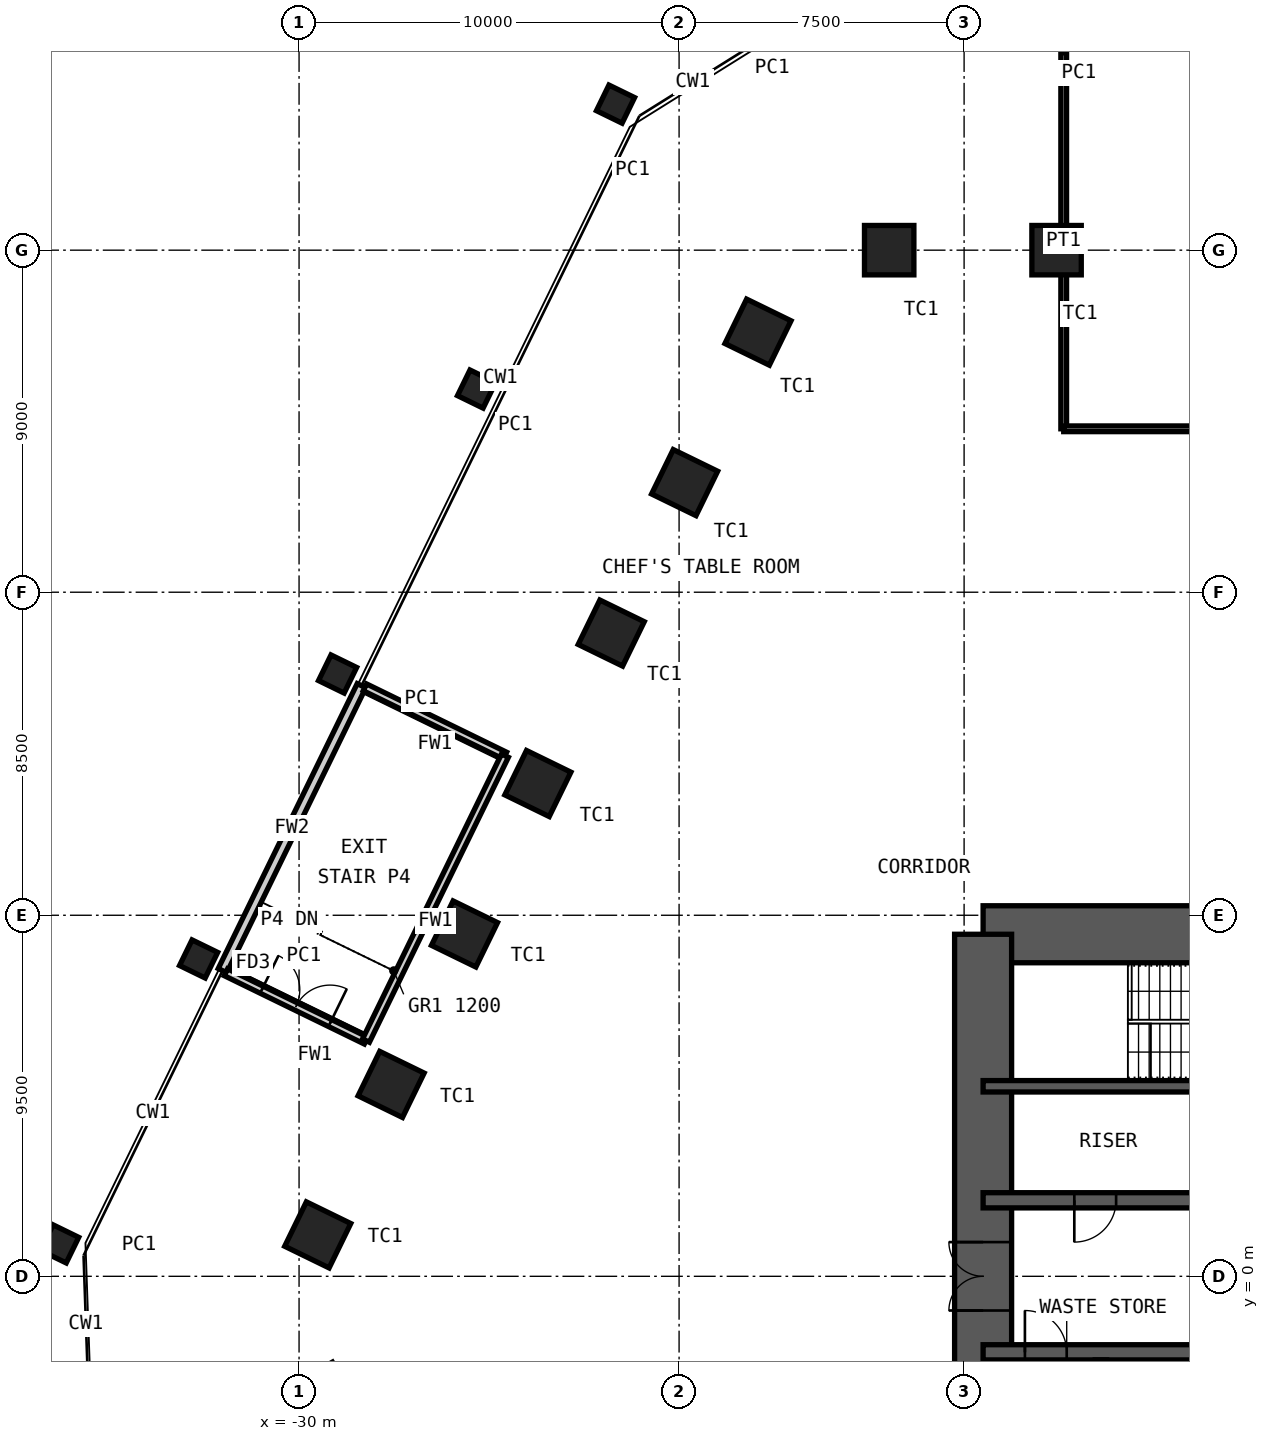
"""IFC4 building model, lengths in metres.
Left out: names, types, materials, properties, quantities, classifications, styles, units other than length and angle.
Written with IfcOpenShell. Run it as: python <this file> out.ifc"""

import sys

from ifc_helpers import new_model, si_unit, direction, frame, frame_2d, origin, origin_2d, place, context, subcontext, project, spatial, rectangle, hollow_rectangle, extrude, element, fill, save


model = new_model("IFC4")
c1 = context("Model", 3, precision=1e-05, world=origin(), true_north=direction((0.0, 1.0)))
c2 = subcontext(c1, "Body", "Model", "MODEL_VIEW")
j1 = project(units=[si_unit("LENGTHUNIT", "METRE"), si_unit("PLANEANGLEUNIT", "RADIAN")], contexts=[c1])
p1 = place(None, origin())
s1 = spatial("IfcSite", under=j1, at=p1, CompositionType="ELEMENT")
p2 = place(p1, origin())
s2 = spatial("IfcBuilding", under=s1, at=p2, CompositionType="ELEMENT")
p3 = place(p2, frame((0.0, 0.0, 12.0)))
s3 = spatial("IfcBuildingStorey", under=s2, at=p3, CompositionType="ELEMENT", Elevation=12.0)
for number, where, z_axis, x_axis in (
    (1, (-14.471, 27.0, 0.0), (0.0, 0.0, 1.0), (-1.0, 0.0, 0.0)),
    (2, (-10.067, 27.0, 0.0), (0.0, 0.0, 1.0), (-1.0, 0.0, 0.0)),
    (3, (-29.509, 1.09, 0.0), (0.0, 0.0, 1.0), (-0.438, -0.899, 0.0)),
    (4, (-27.578, 5.049, 0.0), (0.0, 0.0, 1.0), (-0.438, -0.899, 0.0)),
    (5, (-25.647, 9.008, 0.0), (0.0, 0.0, 1.0), (-0.438, -0.899, 0.0)),
    (6, (-23.716, 12.966, 0.0), (0.0, 0.0, 1.0), (-0.438, -0.899, 0.0)),
    (7, (-21.785, 16.925, 0.0), (0.0, 0.0, 1.0), (-0.438, -0.899, 0.0)),
    (8, (-19.854, 20.884, 0.0), (0.0, 0.0, 1.0), (-0.438, -0.899, 0.0)),
    (9, (-17.924, 24.843, 0.0), (0.0, 0.0, 1.0), (-0.438, -0.899, 0.0)),
):
    element("IfcColumn", number, at=place(p3, frame(where, z_axis=z_axis, x_axis=x_axis)), inside=s3, PredefinedType="COLUMN", context=c2, shape_type="SweptSolid", body=[
        extrude(hollow_rectangle(XDim=1.3, YDim=1.3, WallThickness=0.1, at=origin_2d()), origin(), (0.0, 0.0, 1.0), 5.0),
    ])
for number, where, z_axis, x_axis in (
    (10, (-36.3, 0.853, 0.0), (0.0, 0.0, 1.0), (-0.438, -0.899, 0.0)),
    (11, (-32.643, 8.35, 0.0), (0.0, 0.0, 1.0), (-0.438, -0.899, 0.0)),
    (12, (-28.986, 15.848, 0.0), (0.0, 0.0, 1.0), (-0.438, -0.899, 0.0)),
    (13, (-25.33, 23.345, 0.0), (0.0, 0.0, 1.0), (-0.438, -0.899, 0.0)),
    (14, (-21.673, 30.843, 0.0), (0.0, 0.0, 1.0), (-0.438, -0.899, 0.0)),
):
    element("IfcColumn", number, at=place(p3, frame(where, z_axis=z_axis, x_axis=x_axis)), inside=s3, PredefinedType="COLUMN", context=c2, shape_type="SweptSolid", body=[
        extrude(hollow_rectangle(XDim=0.75, YDim=0.75, WallThickness=0.036, at=origin_2d()), origin(), (0.0, 0.0, 1.0), 5.0),
    ])
p4 = place(p3, frame((-12.0, 9.0, 0.0), z_axis=(0.0, 0.0, 1.0), x_axis=(1.0, 0.0, 0.0)))
e15 = element("IfcWall", 15, at=p4, inside=s3, PredefinedType="SHEAR", context=c2, shape_type="SweptSolid", body=[
    extrude(rectangle(XDim=24.0, YDim=1.5, at=frame_2d((12.0, 0.0))), origin(), (0.0, 0.0, 1.0), 5.0),
])
p5 = place(p4, frame((10.4, 0.0, 0.0)))
e16 = element("IfcOpeningElement", 16, at=p5, cuts=e15, PredefinedType="OPENING", context=c2, shape_type="SweptSolid", body=[
    extrude(rectangle(XDim=1.0, YDim=2.1, at=frame_2d((0.5, 1.05))), frame((0.0, 0.76, 0.0), z_axis=(0.0, -1.0, 0.0), x_axis=(1.0, 0.0, 0.0)), (0.0, 0.0, 1.0), 1.52),
])
p6 = place(p4, frame((17.6, 0.0, 0.0)))
e17 = element("IfcOpeningElement", 17, at=p6, cuts=e15, PredefinedType="OPENING", context=c2, shape_type="SweptSolid", body=[
    extrude(rectangle(XDim=0.9, YDim=2.1, at=frame_2d((0.45, 1.05))), frame((0.0, 0.76, 0.0), z_axis=(0.0, -1.0, 0.0), x_axis=(1.0, 0.0, 0.0)), (0.0, 0.0, 1.0), 1.52),
])
p7 = place(p4, frame((21.9, 0.0, 0.0)))
e18 = element("IfcOpeningElement", 18, at=p7, cuts=e15, PredefinedType="OPENING", context=c2, shape_type="SweptSolid", body=[
    extrude(rectangle(XDim=0.9, YDim=2.1, at=frame_2d((0.45, 1.05))), frame((0.0, 0.76, 0.0), z_axis=(0.0, -1.0, 0.0), x_axis=(1.0, 0.0, 0.0)), (0.0, 0.0, 1.0), 1.52),
])
p8 = place(p3, frame((-12.0, -9.0, 0.0), z_axis=(0.0, 0.0, 1.0), x_axis=(0.0, 1.0, 0.0)))
e19 = element("IfcWall", 19, at=p8, inside=s3, PredefinedType="SHEAR", context=c2, shape_type="SweptSolid", body=[
    extrude(rectangle(XDim=18.0, YDim=1.5, at=frame_2d((9.0, 0.0))), origin(), (0.0, 0.0, 1.0), 5.0),
])
p9 = place(p8, frame((8.1, 0.0, 0.0)))
e20 = element("IfcOpeningElement", 20, at=p9, cuts=e19, PredefinedType="OPENING", context=c2, shape_type="SweptSolid", body=[
    extrude(rectangle(XDim=1.8, YDim=2.1, at=frame_2d((0.9, 1.05))), frame((0.0, 0.76, 0.0), z_axis=(0.0, -1.0, 0.0), x_axis=(1.0, 0.0, 0.0)), (0.0, 0.0, 1.0), 1.52),
])
p10 = place(p3, frame((-12.0, 5.0, 0.0), z_axis=(0.0, 0.0, 1.0), x_axis=(1.0, 0.0, 0.0)))
e21 = element("IfcWall", 21, at=p10, inside=s3, PredefinedType="SHEAR", context=c2, shape_type="SweptSolid", body=[
    extrude(rectangle(XDim=24.0, YDim=0.3, at=frame_2d((12.0, 0.0))), origin(), (0.0, 0.0, 1.0), 5.0),
])
p11 = place(p3, frame((-12.0, 2.0, 0.0), z_axis=(0.0, 0.0, 1.0), x_axis=(1.0, 0.0, 0.0)))
e22 = element("IfcWall", 22, at=p11, inside=s3, PredefinedType="SHEAR", context=c2, shape_type="SweptSolid", body=[
    extrude(rectangle(XDim=24.0, YDim=0.4, at=frame_2d((12.0, 0.0))), origin(), (0.0, 0.0, 1.0), 5.0),
])
p12 = place(p11, frame((2.4, 0.0, 0.0)))
e23 = element("IfcOpeningElement", 23, at=p12, cuts=e22, PredefinedType="OPENING", context=c2, shape_type="SweptSolid", body=[
    extrude(rectangle(XDim=1.1, YDim=2.1, at=frame_2d((0.55, 1.05))), frame((0.0, 0.21, 0.0), z_axis=(0.0, -1.0, 0.0), x_axis=(1.0, 0.0, 0.0)), (0.0, 0.0, 1.0), 0.42),
])
p13 = place(p11, frame((22.0, 0.0, 0.0)))
e24 = element("IfcOpeningElement", 24, at=p13, cuts=e22, PredefinedType="OPENING", context=c2, shape_type="SweptSolid", body=[
    extrude(rectangle(XDim=1.1, YDim=2.1, at=frame_2d((0.55, 1.05))), frame((0.0, 0.21, 0.0), z_axis=(0.0, -1.0, 0.0), x_axis=(1.0, 0.0, 0.0)), (0.0, 0.0, 1.0), 0.42),
])
p14 = place(p11, frame((10.15, 0.0, 0.0)))
e25 = element("IfcOpeningElement", 25, at=p14, cuts=e22, PredefinedType="OPENING", context=c2, shape_type="SweptSolid", body=[
    extrude(rectangle(XDim=1.0, YDim=2.1, at=frame_2d((0.5, 1.05))), frame((0.0, 0.21, 0.0), z_axis=(0.0, -1.0, 0.0), x_axis=(1.0, 0.0, 0.0)), (0.0, 0.0, 1.0), 0.42),
])
p15 = place(p11, frame((6.7, 0.0, 0.0)))
e26 = element("IfcOpeningElement", 26, at=p15, cuts=e22, PredefinedType="OPENING", context=c2, shape_type="SweptSolid", body=[
    extrude(rectangle(XDim=1.4, YDim=2.4, at=frame_2d((0.7, 1.2))), frame((0.0, 0.21, 0.0), z_axis=(0.0, -1.0, 0.0), x_axis=(1.0, 0.0, 0.0)), (0.0, 0.0, 1.0), 0.42),
])
p16 = place(p11, frame((13.35, 0.0, 0.0)))
e27 = element("IfcOpeningElement", 27, at=p16, cuts=e22, PredefinedType="OPENING", context=c2, shape_type="SweptSolid", body=[
    extrude(rectangle(XDim=1.1, YDim=2.4, at=frame_2d((0.55, 1.2))), frame((0.0, 0.21, 0.0), z_axis=(0.0, -1.0, 0.0), x_axis=(1.0, 0.0, 0.0)), (0.0, 0.0, 1.0), 0.42),
])
p17 = place(p11, frame((16.15, 0.0, 0.0)))
e28 = element("IfcOpeningElement", 28, at=p17, cuts=e22, PredefinedType="OPENING", context=c2, shape_type="SweptSolid", body=[
    extrude(rectangle(XDim=1.1, YDim=2.4, at=frame_2d((0.55, 1.2))), frame((0.0, 0.21, 0.0), z_axis=(0.0, -1.0, 0.0), x_axis=(1.0, 0.0, 0.0)), (0.0, 0.0, 1.0), 0.42),
])
p18 = place(p11, frame((18.95, 0.0, 0.0)))
e29 = element("IfcOpeningElement", 29, at=p18, cuts=e22, PredefinedType="OPENING", context=c2, shape_type="SweptSolid", body=[
    extrude(rectangle(XDim=1.1, YDim=2.4, at=frame_2d((0.55, 1.2))), frame((0.0, 0.21, 0.0), z_axis=(0.0, -1.0, 0.0), x_axis=(1.0, 0.0, 0.0)), (0.0, 0.0, 1.0), 0.42),
])
p19 = place(p3, frame((-12.0, -2.0, 0.0), z_axis=(0.0, 0.0, 1.0), x_axis=(1.0, 0.0, 0.0)))
e30 = element("IfcWall", 30, at=p19, inside=s3, PredefinedType="SHEAR", context=c2, shape_type="SweptSolid", body=[
    extrude(rectangle(XDim=24.0, YDim=0.4, at=frame_2d((12.0, 0.0))), origin(), (0.0, 0.0, 1.0), 5.0),
])
p20 = place(p19, frame((1.1, 0.0, 0.0)))
e31 = element("IfcOpeningElement", 31, at=p20, cuts=e30, PredefinedType="OPENING", context=c2, shape_type="SweptSolid", body=[
    extrude(rectangle(XDim=1.1, YDim=2.1, at=frame_2d((0.55, 1.05))), frame((0.0, 0.21, 0.0), z_axis=(0.0, -1.0, 0.0), x_axis=(1.0, 0.0, 0.0)), (0.0, 0.0, 1.0), 0.42),
])
p21 = place(p19, frame((13.55, 0.0, 0.0)))
e32 = element("IfcOpeningElement", 32, at=p21, cuts=e30, PredefinedType="OPENING", context=c2, shape_type="SweptSolid", body=[
    extrude(rectangle(XDim=1.1, YDim=2.1, at=frame_2d((0.55, 1.05))), frame((0.0, 0.21, 0.0), z_axis=(0.0, -1.0, 0.0), x_axis=(1.0, 0.0, 0.0)), (0.0, 0.0, 1.0), 0.42),
])
p22 = place(p19, frame((20.7, 0.0, 0.0)))
e33 = element("IfcOpeningElement", 33, at=p22, cuts=e30, PredefinedType="OPENING", context=c2, shape_type="SweptSolid", body=[
    extrude(rectangle(XDim=1.1, YDim=2.1, at=frame_2d((0.55, 1.05))), frame((0.0, 0.21, 0.0), z_axis=(0.0, -1.0, 0.0), x_axis=(1.0, 0.0, 0.0)), (0.0, 0.0, 1.0), 0.42),
])
p23 = place(p3, frame((-8.9, -4.85, 0.0), z_axis=(0.0, 0.0, 1.0), x_axis=(0.0, 1.0, 0.0)))
e34 = element("IfcWall", 34, at=p23, inside=s3, PredefinedType="PARTITIONING", context=c2, shape_type="SweptSolid", body=[
    extrude(rectangle(XDim=2.65, YDim=0.3, at=frame_2d((1.325, 0.0))), origin(), (0.0, 0.0, 1.0), 4.78),
])
p24 = place(p3, frame((-32.014, 8.043, 0.0), z_axis=(0.0, 0.0, 1.0), x_axis=(0.438364815309, 0.898797134341, 0.0)))
e35 = element("IfcWall", 35, at=p24, inside=s3, PredefinedType="SOLIDWALL", context=c2, shape_type="SweptSolid", body=[
    extrude(rectangle(XDim=8.342, YDim=0.25, at=frame_2d((4.171, 0.0))), origin(), (0.0, 0.0, 1.0), 4.7),
])
p25 = place(p3, frame((-9.879, 32.2, 0.0), z_axis=(0.0, 0.0, 1.0), x_axis=(0.0, -1.0, 0.0)))
e36 = element("IfcWall", 36, at=p25, inside=s3, PredefinedType="PARTITIONING", context=c2, shape_type="SweptSolid", body=[
    extrude(rectangle(XDim=9.9, YDim=0.15, at=frame_2d((4.95, 0.0))), origin(), (0.0, 0.0, 1.0), 4.7),
])
p26 = place(p3, frame((-9.879, 22.3, 0.0), z_axis=(0.0, 0.0, 1.0), x_axis=(1.0, 0.0, 0.0)))
e37 = element("IfcWall", 37, at=p26, inside=s3, PredefinedType="PARTITIONING", context=c2, shape_type="SweptSolid", body=[
    extrude(rectangle(XDim=16.684, YDim=0.15, at=frame_2d((8.342, 0.0))), origin(), (0.0, 0.0, 1.0), 4.7),
])
p27 = place(p26, frame((7.442, 0.0, 0.0)))
e38 = element("IfcOpeningElement", 38, at=p27, cuts=e37, PredefinedType="OPENING", context=c2, shape_type="SweptSolid", body=[
    extrude(rectangle(XDim=1.8, YDim=2.4, at=frame_2d((0.9, 1.2))), frame((0.0, 0.085, 0.0), z_axis=(0.0, -1.0, 0.0), x_axis=(1.0, 0.0, 0.0)), (0.0, 0.0, 1.0), 0.17),
])
p28 = place(p3, frame((-31.924, 8.0, 0.0), z_axis=(0.0, 0.0, 1.0), x_axis=(0.898790191345, -0.438379050529, 0.0)))
e39 = element("IfcWall", 39, at=p28, inside=s3, PredefinedType="PARTITIONING", context=c2, shape_type="SweptSolid", body=[
    extrude(rectangle(XDim=4.1, YDim=0.2, at=frame_2d((2.05, 0.0))), origin(), (0.0, 0.0, 1.0), 4.7),
])
p29 = place(p28, frame((1.05, 0.0, 0.0)))
e40 = element("IfcOpeningElement", 40, at=p29, cuts=e39, PredefinedType="OPENING", context=c2, shape_type="SweptSolid", body=[
    extrude(rectangle(XDim=2.0, YDim=2.4, at=frame_2d((1.0, 1.2))), frame((0.0, 0.11, 0.0), z_axis=(0.0, -1.0, 0.0), x_axis=(1.0, 0.0, 0.0)), (0.0, 0.0, 1.0), 0.22),
])
p30 = place(p3, frame((-28.267, 15.497, 0.0), z_axis=(0.0, 0.0, 1.0), x_axis=(0.898790191345, -0.438379050529, 0.0)))
e41 = element("IfcWall", 41, at=p30, inside=s3, PredefinedType="PARTITIONING", context=c2, shape_type="SweptSolid", body=[
    extrude(rectangle(XDim=4.1, YDim=0.2, at=frame_2d((2.05, 0.0))), origin(), (0.0, 0.0, 1.0), 4.7),
])
p31 = place(p3, frame((-28.239, 6.202, 0.0), z_axis=(0.0, 0.0, 1.0), x_axis=(0.438364815309, 0.898797134341, 0.0)))
e42 = element("IfcWall", 42, at=p31, inside=s3, PredefinedType="PARTITIONING", context=c2, shape_type="SweptSolid", body=[
    extrude(rectangle(XDim=8.342, YDim=0.2, at=frame_2d((4.171, 0.0))), origin(), (0.0, 0.0, 1.0), 4.7),
])
p32 = place(p12, origin())
e43 = element("IfcDoor", 43, at=p32, inside=s3, OperationType="SINGLE_SWING_LEFT", PredefinedType="DOOR", context=c2, shape_type="SweptSolid", body=[
    extrude(rectangle(XDim=1.1, YDim=2.1, at=frame_2d((0.55, 1.05))), frame((0.0, 0.025, 0.0), z_axis=(0.0, -1.0, 0.0), x_axis=(1.0, 0.0, 0.0)), (0.0, 0.0, 1.0), 0.05),
])
fill(e23, e43)
p33 = place(p20, origin())
e44 = element("IfcDoor", 44, at=p33, inside=s3, OperationType="SINGLE_SWING_RIGHT", PredefinedType="DOOR", context=c2, shape_type="SweptSolid", body=[
    extrude(rectangle(XDim=1.1, YDim=2.1, at=frame_2d((0.55, 1.05))), frame((0.0, 0.025, 0.0), z_axis=(0.0, -1.0, 0.0), x_axis=(1.0, 0.0, 0.0)), (0.0, 0.0, 1.0), 0.05),
])
fill(e31, e44)
p34 = place(p9, origin())
e45 = element("IfcDoor", 45, at=p34, inside=s3, OperationType="DOUBLE_DOOR_DOUBLE_SWING", PredefinedType="DOOR", context=c2, shape_type="SweptSolid", body=[
    extrude(rectangle(XDim=1.8, YDim=2.1, at=frame_2d((0.9, 1.05))), frame((0.0, 0.025, 0.0), z_axis=(0.0, -1.0, 0.0), x_axis=(1.0, 0.0, 0.0)), (0.0, 0.0, 1.0), 0.05),
])
fill(e20, e45)
p35 = place(p29, origin())
e46 = element("IfcDoor", 46, at=p35, inside=s3, OperationType="DOUBLE_DOOR_DOUBLE_SWING", PredefinedType="DOOR", context=c2, shape_type="SweptSolid", body=[
    extrude(rectangle(XDim=2.0, YDim=2.4, at=frame_2d((1.0, 1.2))), frame((0.0, 0.025, 0.0), z_axis=(0.0, -1.0, 0.0), x_axis=(1.0, 0.0, 0.0)), (0.0, 0.0, 1.0), 0.05),
])
fill(e40, e46)
save(model, sys.argv[1])
